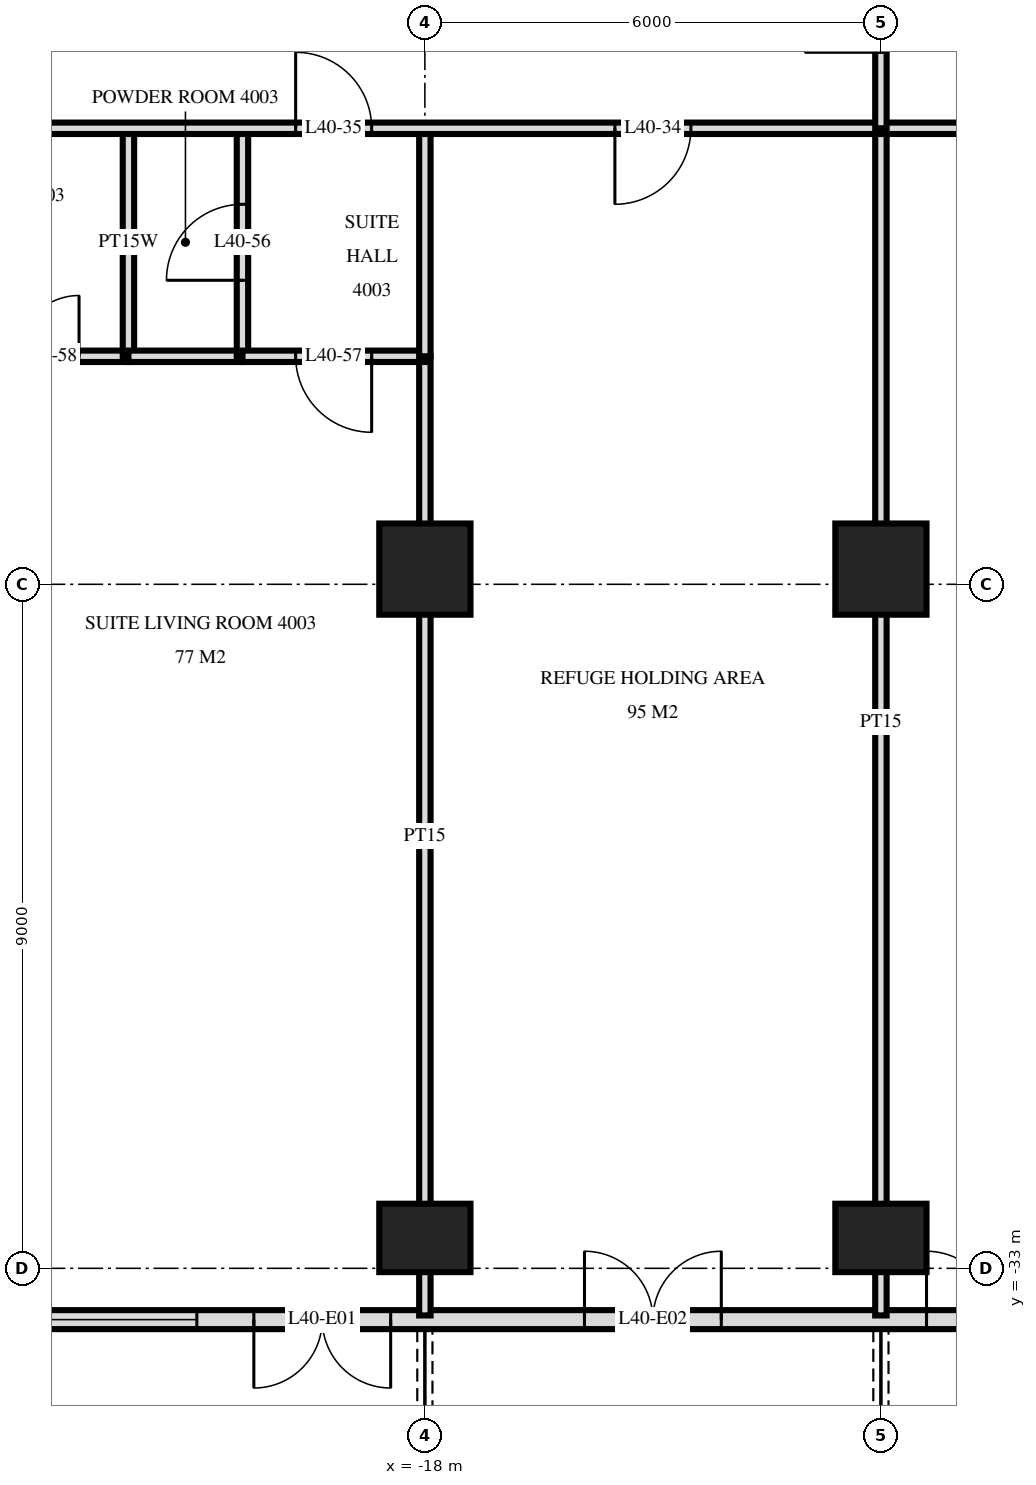
"""IFC4 building model, lengths in metres.
Left out: names, types, materials, properties, quantities, classifications, styles, units other than length and angle.
Written with IfcOpenShell. Run it as: python <this file> out.ifc"""

import sys

from ifc_helpers import new_model, si_unit, direction, frame, frame_2d, origin, origin_2d, place, context, subcontext, project, spatial, rectangle, extrude, element, fill, save


model = new_model("IFC4")
c1 = context("Model", 3, precision=1e-05, world=origin(), true_north=direction((0.0, 1.0)))
c2 = subcontext(c1, "Body", "Model", "MODEL_VIEW")
j1 = project(units=[si_unit("LENGTHUNIT", "METRE"), si_unit("PLANEANGLEUNIT", "RADIAN")], contexts=[c1])
p1 = place(None, origin())
s1 = spatial("IfcSite", under=j1, at=p1, CompositionType="ELEMENT")
p2 = place(p1, origin())
s2 = spatial("IfcBuilding", under=s1, at=p2, CompositionType="ELEMENT")
p3 = place(p2, frame((0.0, 0.0, 156.0)))
s3 = spatial("IfcBuildingStorey", under=s2, at=p3, CompositionType="ELEMENT", Elevation=156.0)
p4 = place(p3, frame((-18.0, -32.6, 0.0), z_axis=(0.0, 0.0, 1.0), x_axis=(1.0, 0.0, 0.0)))
e1 = element("IfcColumn", 1, at=p4, inside=s3, PredefinedType="COLUMN", context=c2, shape_type="SweptSolid", body=[
    extrude(rectangle(XDim=1.2, YDim=0.9, at=origin_2d()), origin(), (0.0, 0.0, 1.0), 3.6),
])
p5 = place(p3, frame((-18.0, -23.8, 0.0), z_axis=(0.0, 0.0, 1.0), x_axis=(1.0, 0.0, 0.0)))
e2 = element("IfcColumn", 2, at=p5, inside=s3, PredefinedType="COLUMN", context=c2, shape_type="SweptSolid", body=[
    extrude(rectangle(XDim=1.2, YDim=1.2, at=origin_2d()), origin(), (0.0, 0.0, 1.0), 3.6),
])
p6 = place(p3, frame((-12.0, -32.6, 0.0), z_axis=(0.0, 0.0, 1.0), x_axis=(1.0, 0.0, 0.0)))
e3 = element("IfcColumn", 3, at=p6, inside=s3, PredefinedType="COLUMN", context=c2, shape_type="SweptSolid", body=[
    extrude(rectangle(XDim=1.2, YDim=0.9, at=origin_2d()), origin(), (0.0, 0.0, 1.0), 3.6),
])
p7 = place(p3, frame((-12.0, -23.8, 0.0), z_axis=(0.0, 0.0, 1.0), x_axis=(1.0, 0.0, 0.0)))
e4 = element("IfcColumn", 4, at=p7, inside=s3, PredefinedType="COLUMN", context=c2, shape_type="SweptSolid", body=[
    extrude(rectangle(XDim=1.2, YDim=1.2, at=origin_2d()), origin(), (0.0, 0.0, 1.0), 3.6),
])
p8 = place(p3, frame((-23.675, -33.675, 0.0), z_axis=(0.0, 0.0, 1.0), x_axis=(1.0, 0.0, 0.0)))
e5 = element("IfcWall", 5, at=p8, inside=s3, PredefinedType="SOLIDWALL", context=c2, shape_type="SweptSolid", body=[
    extrude(rectangle(XDim=47.351, YDim=0.25, at=frame_2d((23.675, 0.0))), origin(), (0.0, 0.0, 1.0), 3.32),
])
p9 = place(p8, frame((0.275, 0.0, 0.3)))
e6 = element("IfcOpeningElement", 6, at=p9, cuts=e5, PredefinedType="OPENING", context=c2, shape_type="SweptSolid", body=[
    extrude(rectangle(XDim=2.4, YDim=2.1, at=frame_2d((1.2, 1.05))), frame((0.0, 0.135, 0.0), z_axis=(0.0, -1.0, 0.0), x_axis=(1.0, 0.0, 0.0)), (0.0, 0.0, 1.0), 0.27),
])
p10 = place(p8, frame((3.425, 0.0, 0.0)))
e7 = element("IfcOpeningElement", 7, at=p10, cuts=e5, PredefinedType="OPENING", context=c2, shape_type="SweptSolid", body=[
    extrude(rectangle(XDim=1.8, YDim=2.4, at=frame_2d((0.9, 1.2))), frame((0.0, 0.135, 0.0), z_axis=(0.0, -1.0, 0.0), x_axis=(1.0, 0.0, 0.0)), (0.0, 0.0, 1.0), 0.27),
])
p11 = place(p8, frame((7.775, 0.0, 0.0)))
e8 = element("IfcOpeningElement", 8, at=p11, cuts=e5, PredefinedType="OPENING", context=c2, shape_type="SweptSolid", body=[
    extrude(rectangle(XDim=1.8, YDim=2.4, at=frame_2d((0.9, 1.2))), frame((0.0, 0.135, 0.0), z_axis=(0.0, -1.0, 0.0), x_axis=(1.0, 0.0, 0.0)), (0.0, 0.0, 1.0), 0.27),
])
p12 = place(p8, frame((12.275, 0.0, 0.0)))
e9 = element("IfcOpeningElement", 9, at=p12, cuts=e5, PredefinedType="OPENING", context=c2, shape_type="SweptSolid", body=[
    extrude(rectangle(XDim=1.8, YDim=2.4, at=frame_2d((0.9, 1.2))), frame((0.0, 0.135, 0.0), z_axis=(0.0, -1.0, 0.0), x_axis=(1.0, 0.0, 0.0)), (0.0, 0.0, 1.0), 0.27),
])
p13 = place(p8, frame((14.975, 0.0, 0.3)))
e10 = element("IfcOpeningElement", 10, at=p13, cuts=e5, PredefinedType="OPENING", context=c2, shape_type="SweptSolid", body=[
    extrude(rectangle(XDim=2.4, YDim=2.1, at=frame_2d((1.2, 1.05))), frame((0.0, 0.135, 0.0), z_axis=(0.0, -1.0, 0.0), x_axis=(1.0, 0.0, 0.0)), (0.0, 0.0, 1.0), 0.27),
])
p14 = place(p8, frame((17.975, 0.0, 0.3)))
e11 = element("IfcOpeningElement", 11, at=p14, cuts=e5, PredefinedType="OPENING", context=c2, shape_type="SweptSolid", body=[
    extrude(rectangle(XDim=2.4, YDim=2.1, at=frame_2d((1.2, 1.05))), frame((0.0, 0.135, 0.0), z_axis=(0.0, -1.0, 0.0), x_axis=(1.0, 0.0, 0.0)), (0.0, 0.0, 1.0), 0.27),
])
p15 = place(p8, frame((21.275, 0.0, 0.0)))
e12 = element("IfcOpeningElement", 12, at=p15, cuts=e5, PredefinedType="OPENING", context=c2, shape_type="SweptSolid", body=[
    extrude(rectangle(XDim=1.8, YDim=2.4, at=frame_2d((0.9, 1.2))), frame((0.0, 0.135, 0.0), z_axis=(0.0, -1.0, 0.0), x_axis=(1.0, 0.0, 0.0)), (0.0, 0.0, 1.0), 0.27),
])
p16 = place(p8, frame((24.275, 0.0, 0.0)))
e13 = element("IfcOpeningElement", 13, at=p16, cuts=e5, PredefinedType="OPENING", context=c2, shape_type="SweptSolid", body=[
    extrude(rectangle(XDim=1.8, YDim=2.4, at=frame_2d((0.9, 1.2))), frame((0.0, 0.135, 0.0), z_axis=(0.0, -1.0, 0.0), x_axis=(1.0, 0.0, 0.0)), (0.0, 0.0, 1.0), 0.27),
])
p17 = place(p8, frame((26.975, 0.0, 0.3)))
e14 = element("IfcOpeningElement", 14, at=p17, cuts=e5, PredefinedType="OPENING", context=c2, shape_type="SweptSolid", body=[
    extrude(rectangle(XDim=2.4, YDim=2.1, at=frame_2d((1.2, 1.05))), frame((0.0, 0.135, 0.0), z_axis=(0.0, -1.0, 0.0), x_axis=(1.0, 0.0, 0.0)), (0.0, 0.0, 1.0), 0.27),
])
p18 = place(p8, frame((30.275, 0.0, 0.0)))
e15 = element("IfcOpeningElement", 15, at=p18, cuts=e5, PredefinedType="OPENING", context=c2, shape_type="SweptSolid", body=[
    extrude(rectangle(XDim=1.8, YDim=2.4, at=frame_2d((0.9, 1.2))), frame((0.0, 0.135, 0.0), z_axis=(0.0, -1.0, 0.0), x_axis=(1.0, 0.0, 0.0)), (0.0, 0.0, 1.0), 0.27),
])
p19 = place(p8, frame((32.975, 0.0, 0.3)))
e16 = element("IfcOpeningElement", 16, at=p19, cuts=e5, PredefinedType="OPENING", context=c2, shape_type="SweptSolid", body=[
    extrude(rectangle(XDim=2.4, YDim=2.1, at=frame_2d((1.2, 1.05))), frame((0.0, 0.135, 0.0), z_axis=(0.0, -1.0, 0.0), x_axis=(1.0, 0.0, 0.0)), (0.0, 0.0, 1.0), 0.27),
])
p20 = place(p8, frame((36.275, 0.0, 0.0)))
e17 = element("IfcOpeningElement", 17, at=p20, cuts=e5, PredefinedType="OPENING", context=c2, shape_type="SweptSolid", body=[
    extrude(rectangle(XDim=1.8, YDim=2.4, at=frame_2d((0.9, 1.2))), frame((0.0, 0.135, 0.0), z_axis=(0.0, -1.0, 0.0), x_axis=(1.0, 0.0, 0.0)), (0.0, 0.0, 1.0), 0.27),
])
p21 = place(p8, frame((38.975, 0.0, 0.3)))
e18 = element("IfcOpeningElement", 18, at=p21, cuts=e5, PredefinedType="OPENING", context=c2, shape_type="SweptSolid", body=[
    extrude(rectangle(XDim=2.4, YDim=2.1, at=frame_2d((1.2, 1.05))), frame((0.0, 0.135, 0.0), z_axis=(0.0, -1.0, 0.0), x_axis=(1.0, 0.0, 0.0)), (0.0, 0.0, 1.0), 0.27),
])
p22 = place(p8, frame((41.975, 0.0, 0.3)))
e19 = element("IfcOpeningElement", 19, at=p22, cuts=e5, PredefinedType="OPENING", context=c2, shape_type="SweptSolid", body=[
    extrude(rectangle(XDim=2.4, YDim=2.1, at=frame_2d((1.2, 1.05))), frame((0.0, 0.135, 0.0), z_axis=(0.0, -1.0, 0.0), x_axis=(1.0, 0.0, 0.0)), (0.0, 0.0, 1.0), 0.27),
])
p23 = place(p8, frame((45.125, 0.0, 0.0)))
e20 = element("IfcOpeningElement", 20, at=p23, cuts=e5, PredefinedType="OPENING", context=c2, shape_type="SweptSolid", body=[
    extrude(rectangle(XDim=1.8, YDim=2.4, at=frame_2d((0.9, 1.2))), frame((0.0, 0.135, 0.0), z_axis=(0.0, -1.0, 0.0), x_axis=(1.0, 0.0, 0.0)), (0.0, 0.0, 1.0), 0.27),
])
p24 = place(p3, frame((-12.0, -18.0, 0.0), z_axis=(0.0, 0.0, 1.0), x_axis=(0.0, 1.0, 0.0)))
e21 = element("IfcWall", 21, at=p24, inside=s3, PredefinedType="PARTITIONING", context=c2, shape_type="SweptSolid", body=[
    extrude(rectangle(XDim=2.95, YDim=0.15, at=frame_2d((1.475, 0.0))), origin(), (0.0, 0.0, 1.0), 3.32),
])
p25 = place(p24, frame((1.0, 0.0, 0.0)))
e22 = element("IfcOpeningElement", 22, at=p25, cuts=e21, PredefinedType="OPENING", context=c2, shape_type="SweptSolid", body=[
    extrude(rectangle(XDim=1.0, YDim=2.1, at=frame_2d((0.5, 1.05))), frame((0.0, 0.085, 0.0), z_axis=(0.0, -1.0, 0.0), x_axis=(1.0, 0.0, 0.0)), (0.0, 0.0, 1.0), 0.17),
])
p26 = place(p3, frame((-12.0, -33.62, 0.0), z_axis=(0.0, 0.0, 1.0), x_axis=(0.0, 1.0, 0.0)))
e23 = element("IfcWall", 23, at=p26, inside=s3, PredefinedType="PARTITIONING", context=c2, shape_type="SweptSolid", body=[
    extrude(rectangle(XDim=15.62, YDim=0.15, at=frame_2d((7.81, 0.0))), origin(), (0.0, 0.0, 1.0), 3.32),
])
p27 = place(p3, frame((-18.0, -21.0, 0.0), z_axis=(0.0, 0.0, 1.0), x_axis=(0.0, 1.0, 0.0)))
e24 = element("IfcWall", 24, at=p27, inside=s3, PredefinedType="PARTITIONING", context=c2, shape_type="SweptSolid", body=[
    extrude(rectangle(XDim=3.0, YDim=0.15, at=frame_2d((1.5, 0.0))), origin(), (0.0, 0.0, 1.0), 3.32),
])
p28 = place(p3, frame((-18.0, -33.62, 0.0), z_axis=(0.0, 0.0, 1.0), x_axis=(0.0, 1.0, 0.0)))
e25 = element("IfcWall", 25, at=p28, inside=s3, PredefinedType="PARTITIONING", context=c2, shape_type="SweptSolid", body=[
    extrude(rectangle(XDim=12.62, YDim=0.15, at=frame_2d((6.31, 0.0))), origin(), (0.0, 0.0, 1.0), 3.32),
])
p29 = place(p3, frame((-20.4, -21.0, 0.0), z_axis=(0.0, 0.0, 1.0), x_axis=(0.0, 1.0, 0.0)))
e26 = element("IfcWall", 26, at=p29, inside=s3, PredefinedType="PARTITIONING", context=c2, shape_type="SweptSolid", body=[
    extrude(rectangle(XDim=3.0, YDim=0.15, at=frame_2d((1.5, 0.0))), origin(), (0.0, 0.0, 1.0), 3.32),
])
p30 = place(p29, frame((1.0, 0.0, 0.0)))
e27 = element("IfcOpeningElement", 27, at=p30, cuts=e26, PredefinedType="OPENING", context=c2, shape_type="SweptSolid", body=[
    extrude(rectangle(XDim=1.0, YDim=2.1, at=frame_2d((0.5, 1.05))), frame((0.0, 0.085, 0.0), z_axis=(0.0, -1.0, 0.0), x_axis=(1.0, 0.0, 0.0)), (0.0, 0.0, 1.0), 0.17),
])
p31 = place(p3, frame((-21.9, -21.0, 0.0), z_axis=(0.0, 0.0, 1.0), x_axis=(0.0, 1.0, 0.0)))
e28 = element("IfcWall", 28, at=p31, inside=s3, PredefinedType="PLUMBINGWALL", context=c2, shape_type="SweptSolid", body=[
    extrude(rectangle(XDim=3.0, YDim=0.15, at=frame_2d((1.5, 0.0))), origin(), (0.0, 0.0, 1.0), 3.32),
])
p32 = place(p3, frame((-20.4, -21.0, 0.0), z_axis=(0.0, 0.0, 1.0), x_axis=(1.0, 0.0, 0.0)))
e29 = element("IfcWall", 29, at=p32, inside=s3, PredefinedType="PARTITIONING", context=c2, shape_type="SweptSolid", body=[
    extrude(rectangle(XDim=2.4, YDim=0.15, at=frame_2d((1.2, 0.0))), origin(), (0.0, 0.0, 1.0), 3.32),
])
p33 = place(p32, frame((0.7, 0.0, 0.0)))
e30 = element("IfcOpeningElement", 30, at=p33, cuts=e29, PredefinedType="OPENING", context=c2, shape_type="SweptSolid", body=[
    extrude(rectangle(XDim=1.0, YDim=2.1, at=frame_2d((0.5, 1.05))), frame((0.0, 0.085, 0.0), z_axis=(0.0, -1.0, 0.0), x_axis=(1.0, 0.0, 0.0)), (0.0, 0.0, 1.0), 0.17),
])
p34 = place(p3, frame((-28.02, -21.0, 0.0), z_axis=(0.0, 0.0, 1.0), x_axis=(1.0, 0.0, 0.0)))
e31 = element("IfcWall", 31, at=p34, inside=s3, PredefinedType="PARTITIONING", context=c2, shape_type="SweptSolid", body=[
    extrude(rectangle(XDim=6.12, YDim=0.15, at=frame_2d((3.06, 0.0))), origin(), (0.0, 0.0, 1.0), 3.32),
])
p35 = place(p34, frame((4.67, 0.0, 0.0)))
e32 = element("IfcOpeningElement", 32, at=p35, cuts=e31, PredefinedType="OPENING", context=c2, shape_type="SweptSolid", body=[
    extrude(rectangle(XDim=0.8, YDim=2.1, at=frame_2d((0.4, 1.05))), frame((0.0, 0.085, 0.0), z_axis=(0.0, -1.0, 0.0), x_axis=(1.0, 0.0, 0.0)), (0.0, 0.0, 1.0), 0.17),
])
p36 = place(p34, frame((1.02, 0.0, 0.0)))
e33 = element("IfcOpeningElement", 33, at=p36, cuts=e31, PredefinedType="OPENING", context=c2, shape_type="SweptSolid", body=[
    extrude(rectangle(XDim=0.9, YDim=2.1, at=frame_2d((0.45, 1.05))), frame((0.0, 0.085, 0.0), z_axis=(0.0, -1.0, 0.0), x_axis=(1.0, 0.0, 0.0)), (0.0, 0.0, 1.0), 0.17),
])
p37 = place(p3, frame((-21.9, -21.0, 0.0), z_axis=(0.0, 0.0, 1.0), x_axis=(1.0, 0.0, 0.0)))
e34 = element("IfcWall", 34, at=p37, inside=s3, PredefinedType="PLUMBINGWALL", context=c2, shape_type="SweptSolid", body=[
    extrude(rectangle(XDim=1.5, YDim=0.15, at=frame_2d((0.75, 0.0))), origin(), (0.0, 0.0, 1.0), 3.32),
])
p38 = place(p3, frame((-28.02, -18.0, 0.0), z_axis=(0.0, 0.0, 1.0), x_axis=(1.0, 0.0, 0.0)))
e35 = element("IfcWall", 35, at=p38, inside=s3, PredefinedType="PARTITIONING", context=c2, shape_type="SweptSolid", body=[
    extrude(rectangle(XDim=56.04, YDim=0.15, at=frame_2d((28.02, 0.0))), origin(), (0.0, 0.0, 1.0), 3.32),
])
p39 = place(p38, frame((12.52, 0.0, 0.0)))
e36 = element("IfcOpeningElement", 36, at=p39, cuts=e35, PredefinedType="OPENING", context=c2, shape_type="SweptSolid", body=[
    extrude(rectangle(XDim=1.0, YDim=2.1, at=frame_2d((0.5, 1.05))), frame((0.0, 0.085, 0.0), z_axis=(0.0, -1.0, 0.0), x_axis=(1.0, 0.0, 0.0)), (0.0, 0.0, 1.0), 0.17),
])
p40 = place(p38, frame((8.32, 0.0, 0.0)))
e37 = element("IfcOpeningElement", 37, at=p40, cuts=e35, PredefinedType="OPENING", context=c2, shape_type="SweptSolid", body=[
    extrude(rectangle(XDim=1.0, YDim=2.1, at=frame_2d((0.5, 1.05))), frame((0.0, 0.085, 0.0), z_axis=(0.0, -1.0, 0.0), x_axis=(1.0, 0.0, 0.0)), (0.0, 0.0, 1.0), 0.17),
])
p41 = place(p38, frame((40.17, 0.0, 0.0)))
e38 = element("IfcOpeningElement", 38, at=p41, cuts=e35, PredefinedType="OPENING", context=c2, shape_type="SweptSolid", body=[
    extrude(rectangle(XDim=1.0, YDim=2.1, at=frame_2d((0.5, 1.05))), frame((0.0, 0.085, 0.0), z_axis=(0.0, -1.0, 0.0), x_axis=(1.0, 0.0, 0.0)), (0.0, 0.0, 1.0), 0.17),
])
p42 = place(p38, frame((44.87, 0.0, 0.0)))
e39 = element("IfcOpeningElement", 39, at=p42, cuts=e35, PredefinedType="OPENING", context=c2, shape_type="SweptSolid", body=[
    extrude(rectangle(XDim=1.0, YDim=2.1, at=frame_2d((0.5, 1.05))), frame((0.0, 0.085, 0.0), z_axis=(0.0, -1.0, 0.0), x_axis=(1.0, 0.0, 0.0)), (0.0, 0.0, 1.0), 0.17),
])
p43 = place(p38, frame((46.72, 0.0, 0.0)))
e40 = element("IfcOpeningElement", 40, at=p43, cuts=e35, PredefinedType="OPENING", context=c2, shape_type="SweptSolid", body=[
    extrude(rectangle(XDim=1.0, YDim=2.1, at=frame_2d((0.5, 1.05))), frame((0.0, 0.085, 0.0), z_axis=(0.0, -1.0, 0.0), x_axis=(1.0, 0.0, 0.0)), (0.0, 0.0, 1.0), 0.17),
])
p44 = place(p38, frame((18.52, 0.0, 0.0)))
e41 = element("IfcOpeningElement", 41, at=p44, cuts=e35, PredefinedType="OPENING", context=c2, shape_type="SweptSolid", body=[
    extrude(rectangle(XDim=1.0, YDim=2.1, at=frame_2d((0.5, 1.05))), frame((0.0, 0.085, 0.0), z_axis=(0.0, -1.0, 0.0), x_axis=(1.0, 0.0, 0.0)), (0.0, 0.0, 1.0), 0.17),
])
p45 = place(p38, frame((24.52, 0.0, 0.0)))
e42 = element("IfcOpeningElement", 42, at=p45, cuts=e35, PredefinedType="OPENING", context=c2, shape_type="SweptSolid", body=[
    extrude(rectangle(XDim=1.0, YDim=2.1, at=frame_2d((0.5, 1.05))), frame((0.0, 0.085, 0.0), z_axis=(0.0, -1.0, 0.0), x_axis=(1.0, 0.0, 0.0)), (0.0, 0.0, 1.0), 0.17),
])
p46 = place(p38, frame((30.52, 0.0, 0.0)))
e43 = element("IfcOpeningElement", 43, at=p46, cuts=e35, PredefinedType="OPENING", context=c2, shape_type="SweptSolid", body=[
    extrude(rectangle(XDim=1.0, YDim=2.1, at=frame_2d((0.5, 1.05))), frame((0.0, 0.085, 0.0), z_axis=(0.0, -1.0, 0.0), x_axis=(1.0, 0.0, 0.0)), (0.0, 0.0, 1.0), 0.17),
])
p47 = place(p38, frame((36.52, 0.0, 0.0)))
e44 = element("IfcOpeningElement", 44, at=p47, cuts=e35, PredefinedType="OPENING", context=c2, shape_type="SweptSolid", body=[
    extrude(rectangle(XDim=1.0, YDim=2.1, at=frame_2d((0.5, 1.05))), frame((0.0, 0.085, 0.0), z_axis=(0.0, -1.0, 0.0), x_axis=(1.0, 0.0, 0.0)), (0.0, 0.0, 1.0), 0.17),
])
p48 = place(p9, origin())
e45 = element("IfcWindow", 45, at=p48, inside=s3, PartitioningType="SINGLE_PANEL", PredefinedType="WINDOW", context=c2, shape_type="SweptSolid", body=[
    extrude(rectangle(XDim=2.4, YDim=2.1, at=frame_2d((1.2, 1.05))), frame((0.0, 0.03, 0.0), z_axis=(0.0, -1.0, 0.0), x_axis=(1.0, 0.0, 0.0)), (0.0, 0.0, 1.0), 0.06),
])
fill(e6, e45)
p49 = place(p10, frame((0.9, 0.0, 0.0), z_axis=(0.0, 0.0, 1.0), x_axis=(-1.0, 0.0, 0.0)))
e46 = element("IfcDoor", 46, at=p49, inside=s3, OperationType="DOUBLE_DOOR_SINGLE_SWING", PredefinedType="DOOR", context=c2, shape_type="SweptSolid", body=[
    extrude(rectangle(XDim=1.8, YDim=2.4, at=frame_2d((0.0, 1.2))), frame((0.0, -0.025, 0.0), z_axis=(0.0, 1.0, 0.0), x_axis=(-1.0, 0.0, 0.0)), (0.0, 0.0, 1.0), 0.05),
])
fill(e7, e46)
p50 = place(p11, origin())
e47 = element("IfcDoor", 47, at=p50, inside=s3, OperationType="DOUBLE_DOOR_SINGLE_SWING", PredefinedType="DOOR", context=c2, shape_type="SweptSolid", body=[
    extrude(rectangle(XDim=1.8, YDim=2.4, at=frame_2d((0.9, 1.2))), frame((0.0, 0.025, 0.0), z_axis=(0.0, -1.0, 0.0), x_axis=(1.0, 0.0, 0.0)), (0.0, 0.0, 1.0), 0.05),
])
fill(e8, e47)
p51 = place(p12, origin())
e48 = element("IfcDoor", 48, at=p51, inside=s3, OperationType="DOUBLE_DOOR_SINGLE_SWING", PredefinedType="DOOR", context=c2, shape_type="SweptSolid", body=[
    extrude(rectangle(XDim=1.8, YDim=2.4, at=frame_2d((0.9, 1.2))), frame((0.0, 0.025, 0.0), z_axis=(0.0, -1.0, 0.0), x_axis=(1.0, 0.0, 0.0)), (0.0, 0.0, 1.0), 0.05),
])
fill(e9, e48)
p52 = place(p39, frame((0.5, 0.0, 0.0), z_axis=(0.0, 0.0, 1.0), x_axis=(-1.0, 0.0, 0.0)))
e49 = element("IfcDoor", 49, at=p52, inside=s3, OperationType="SINGLE_SWING_LEFT", PredefinedType="DOOR", context=c2, shape_type="SweptSolid", body=[
    extrude(rectangle(XDim=1.0, YDim=2.1, at=frame_2d((0.0, 1.05))), frame((0.0, -0.025, 0.0), z_axis=(0.0, 1.0, 0.0), x_axis=(-1.0, 0.0, 0.0)), (0.0, 0.0, 1.0), 0.05),
])
fill(e36, e49)
p53 = place(p40, origin())
e50 = element("IfcDoor", 50, at=p53, inside=s3, OperationType="SINGLE_SWING_RIGHT", PredefinedType="DOOR", context=c2, shape_type="SweptSolid", body=[
    extrude(rectangle(XDim=1.0, YDim=2.1, at=frame_2d((0.5, 1.05))), frame((0.0, 0.025, 0.0), z_axis=(0.0, -1.0, 0.0), x_axis=(1.0, 0.0, 0.0)), (0.0, 0.0, 1.0), 0.05),
])
fill(e37, e50)
p54 = place(p30, origin())
e51 = element("IfcDoor", 51, at=p54, inside=s3, OperationType="SINGLE_SWING_RIGHT", PredefinedType="DOOR", context=c2, shape_type="SweptSolid", body=[
    extrude(rectangle(XDim=1.0, YDim=2.1, at=frame_2d((0.5, 1.05))), frame((0.0, 0.025, 0.0), z_axis=(0.0, -1.0, 0.0), x_axis=(1.0, 0.0, 0.0)), (0.0, 0.0, 1.0), 0.05),
])
fill(e27, e51)
p55 = place(p33, frame((0.5, 0.0, 0.0), z_axis=(0.0, 0.0, 1.0), x_axis=(-1.0, 0.0, 0.0)))
e52 = element("IfcDoor", 52, at=p55, inside=s3, OperationType="SINGLE_SWING_RIGHT", PredefinedType="DOOR", context=c2, shape_type="SweptSolid", body=[
    extrude(rectangle(XDim=1.0, YDim=2.1, at=frame_2d((0.0, 1.05))), frame((0.0, -0.025, 0.0), z_axis=(0.0, 1.0, 0.0), x_axis=(-1.0, 0.0, 0.0)), (0.0, 0.0, 1.0), 0.05),
])
fill(e30, e52)
p56 = place(p35, origin())
e53 = element("IfcDoor", 53, at=p56, inside=s3, OperationType="SINGLE_SWING_LEFT", PredefinedType="DOOR", context=c2, shape_type="SweptSolid", body=[
    extrude(rectangle(XDim=0.8, YDim=2.1, at=frame_2d((0.4, 1.05))), frame((0.0, 0.025, 0.0), z_axis=(0.0, -1.0, 0.0), x_axis=(1.0, 0.0, 0.0)), (0.0, 0.0, 1.0), 0.05),
])
fill(e32, e53)
save(model, sys.argv[1])
